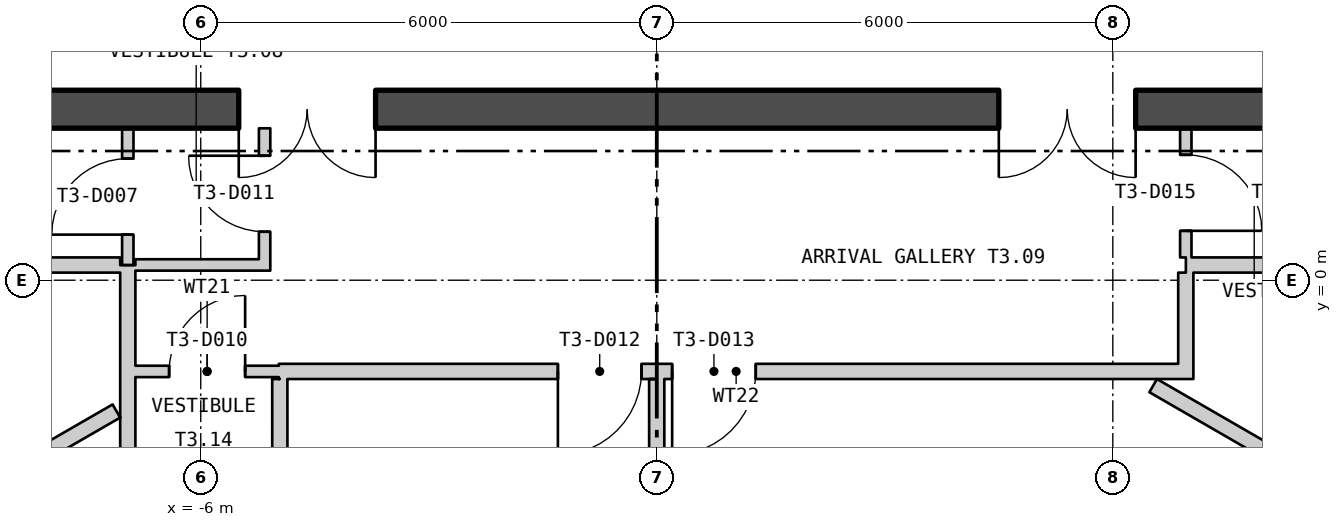
"""IFC4 building model, lengths in metres.
Left out: names, types, materials, properties, quantities, classifications, styles, units other than length and angle.
Written with IfcOpenShell. Run it as: python <this file> out.ifc"""

import sys

from ifc_helpers import new_model, si_unit, direction, frame, frame_2d, origin, place, context, subcontext, project, spatial, polyline, rectangle, outline, extrude, element, fill, save


model = new_model("IFC4")
c1 = context("Model", 3, precision=1e-05, world=origin(), true_north=direction((0.0, 1.0)))
c2 = subcontext(c1, "Body", "Model", "MODEL_VIEW")
j1 = project(units=[si_unit("LENGTHUNIT", "METRE"), si_unit("PLANEANGLEUNIT", "RADIAN")], contexts=[c1])
p1 = place(None, origin())
s1 = spatial("IfcSite", under=j1, at=p1, CompositionType="ELEMENT")
p2 = place(p1, origin())
s2 = spatial("IfcBuilding", under=s1, at=p2, CompositionType="ELEMENT")
p3 = place(p2, frame((0.0, 0.0, 186.6)))
s3 = spatial("IfcBuildingStorey", under=s2, at=p3, CompositionType="ELEMENT", Elevation=186.6)
p4 = place(p3, frame((-26.67, 13.393, -0.18), z_axis=(0.0, 0.0, 1.0), x_axis=(0.500000711659, -0.866024992908, 0.0)))
e1 = element("IfcWall", 1, at=p4, inside=s3, PredefinedType="SOLIDWALL", context=c2, shape_type="SweptSolid", body=[
    extrude(outline(polyline([(-0.13, -0.225), (45.87, -0.225), (45.61, 0.225), (0.13, 0.225), (-0.13, -0.225)])), origin(), (0.0, 0.0, 1.0), 6.0),
])
p5 = place(p4, frame((1.424, 0.0, 1.38)))
e2 = element("IfcOpeningElement", 2, at=p5, cuts=e1, PredefinedType="OPENING", context=c2, shape_type="SweptSolid", body=[
    extrude(rectangle(XDim=2.4, YDim=3.6, at=frame_2d((1.2, 1.8))), frame((0.0, 0.235, 0.0), z_axis=(0.0, -1.0, 0.0), x_axis=(1.0, 0.0, 0.0)), (0.0, 0.0, 1.0), 0.47),
])
p6 = place(p4, frame((5.893, 0.0, 1.38)))
e3 = element("IfcOpeningElement", 3, at=p6, cuts=e1, PredefinedType="OPENING", context=c2, shape_type="SweptSolid", body=[
    extrude(rectangle(XDim=2.4, YDim=3.6, at=frame_2d((1.2, 1.8))), frame((0.0, 0.235, 0.0), z_axis=(0.0, -1.0, 0.0), x_axis=(1.0, 0.0, 0.0)), (0.0, 0.0, 1.0), 0.47),
])
p7 = place(p4, frame((10.401, 0.0, 1.38)))
e4 = element("IfcOpeningElement", 4, at=p7, cuts=e1, PredefinedType="OPENING", context=c2, shape_type="SweptSolid", body=[
    extrude(rectangle(XDim=2.4, YDim=3.6, at=frame_2d((1.2, 1.8))), frame((0.0, 0.235, 0.0), z_axis=(0.0, -1.0, 0.0), x_axis=(1.0, 0.0, 0.0)), (0.0, 0.0, 1.0), 0.47),
])
p8 = place(p4, frame((14.909, 0.0, 1.38)))
e5 = element("IfcOpeningElement", 5, at=p8, cuts=e1, PredefinedType="OPENING", context=c2, shape_type="SweptSolid", body=[
    extrude(rectangle(XDim=2.4, YDim=3.6, at=frame_2d((1.2, 1.8))), frame((0.0, 0.235, 0.0), z_axis=(0.0, -1.0, 0.0), x_axis=(1.0, 0.0, 0.0)), (0.0, 0.0, 1.0), 0.47),
])
p9 = place(p4, frame((19.416, 0.0, 1.38)))
e6 = element("IfcOpeningElement", 6, at=p9, cuts=e1, PredefinedType="OPENING", context=c2, shape_type="SweptSolid", body=[
    extrude(rectangle(XDim=2.4, YDim=3.6, at=frame_2d((1.2, 1.8))), frame((0.0, 0.235, 0.0), z_axis=(0.0, -1.0, 0.0), x_axis=(1.0, 0.0, 0.0)), (0.0, 0.0, 1.0), 0.47),
])
p10 = place(p4, frame((23.924, 0.0, 1.38)))
e7 = element("IfcOpeningElement", 7, at=p10, cuts=e1, PredefinedType="OPENING", context=c2, shape_type="SweptSolid", body=[
    extrude(rectangle(XDim=2.4, YDim=3.6, at=frame_2d((1.2, 1.8))), frame((0.0, 0.235, 0.0), z_axis=(0.0, -1.0, 0.0), x_axis=(1.0, 0.0, 0.0)), (0.0, 0.0, 1.0), 0.47),
])
p11 = place(p4, frame((28.431, 0.0, 1.38)))
e8 = element("IfcOpeningElement", 8, at=p11, cuts=e1, PredefinedType="OPENING", context=c2, shape_type="SweptSolid", body=[
    extrude(rectangle(XDim=2.4, YDim=3.6, at=frame_2d((1.2, 1.8))), frame((0.0, 0.235, 0.0), z_axis=(0.0, -1.0, 0.0), x_axis=(1.0, 0.0, 0.0)), (0.0, 0.0, 1.0), 0.47),
])
p12 = place(p4, frame((32.939, 0.0, 1.38)))
e9 = element("IfcOpeningElement", 9, at=p12, cuts=e1, PredefinedType="OPENING", context=c2, shape_type="SweptSolid", body=[
    extrude(rectangle(XDim=2.4, YDim=3.6, at=frame_2d((1.2, 1.8))), frame((0.0, 0.235, 0.0), z_axis=(0.0, -1.0, 0.0), x_axis=(1.0, 0.0, 0.0)), (0.0, 0.0, 1.0), 0.47),
])
p13 = place(p4, frame((37.447, 0.0, 1.38)))
e10 = element("IfcOpeningElement", 10, at=p13, cuts=e1, PredefinedType="OPENING", context=c2, shape_type="SweptSolid", body=[
    extrude(rectangle(XDim=2.4, YDim=3.6, at=frame_2d((1.2, 1.8))), frame((0.0, 0.235, 0.0), z_axis=(0.0, -1.0, 0.0), x_axis=(1.0, 0.0, 0.0)), (0.0, 0.0, 1.0), 0.47),
])
p14 = place(p4, frame((41.916, 0.0, 1.38)))
e11 = element("IfcOpeningElement", 11, at=p14, cuts=e1, PredefinedType="OPENING", context=c2, shape_type="SweptSolid", body=[
    extrude(rectangle(XDim=2.4, YDim=3.6, at=frame_2d((1.2, 1.8))), frame((0.0, 0.235, 0.0), z_axis=(0.0, -1.0, 0.0), x_axis=(1.0, 0.0, 0.0)), (0.0, 0.0, 1.0), 0.47),
])
p15 = place(p3, frame((3.8, -26.219, -0.18), z_axis=(0.0, 0.0, 1.0), x_axis=(0.500000711659, 0.866024992908, 0.0)))
e12 = element("IfcWall", 12, at=p15, inside=s3, PredefinedType="SOLIDWALL", context=c2, shape_type="SweptSolid", body=[
    extrude(outline(polyline([(-0.13, -0.225), (45.87, -0.225), (45.61, 0.225), (0.13, 0.225), (-0.13, -0.225)])), origin(), (0.0, 0.0, 1.0), 6.0),
])
p16 = place(p15, frame((1.424, 0.0, 1.38)))
e13 = element("IfcOpeningElement", 13, at=p16, cuts=e12, PredefinedType="OPENING", context=c2, shape_type="SweptSolid", body=[
    extrude(rectangle(XDim=2.4, YDim=3.6, at=frame_2d((1.2, 1.8))), frame((0.0, 0.235, 0.0), z_axis=(0.0, -1.0, 0.0), x_axis=(1.0, 0.0, 0.0)), (0.0, 0.0, 1.0), 0.47),
])
p17 = place(p15, frame((5.893, 0.0, 1.38)))
e14 = element("IfcOpeningElement", 14, at=p17, cuts=e12, PredefinedType="OPENING", context=c2, shape_type="SweptSolid", body=[
    extrude(rectangle(XDim=2.4, YDim=3.6, at=frame_2d((1.2, 1.8))), frame((0.0, 0.235, 0.0), z_axis=(0.0, -1.0, 0.0), x_axis=(1.0, 0.0, 0.0)), (0.0, 0.0, 1.0), 0.47),
])
p18 = place(p15, frame((10.401, 0.0, 1.38)))
e15 = element("IfcOpeningElement", 15, at=p18, cuts=e12, PredefinedType="OPENING", context=c2, shape_type="SweptSolid", body=[
    extrude(rectangle(XDim=2.4, YDim=3.6, at=frame_2d((1.2, 1.8))), frame((0.0, 0.235, 0.0), z_axis=(0.0, -1.0, 0.0), x_axis=(1.0, 0.0, 0.0)), (0.0, 0.0, 1.0), 0.47),
])
p19 = place(p15, frame((14.909, 0.0, 1.38)))
e16 = element("IfcOpeningElement", 16, at=p19, cuts=e12, PredefinedType="OPENING", context=c2, shape_type="SweptSolid", body=[
    extrude(rectangle(XDim=2.4, YDim=3.6, at=frame_2d((1.2, 1.8))), frame((0.0, 0.235, 0.0), z_axis=(0.0, -1.0, 0.0), x_axis=(1.0, 0.0, 0.0)), (0.0, 0.0, 1.0), 0.47),
])
p20 = place(p15, frame((19.416, 0.0, 1.38)))
e17 = element("IfcOpeningElement", 17, at=p20, cuts=e12, PredefinedType="OPENING", context=c2, shape_type="SweptSolid", body=[
    extrude(rectangle(XDim=2.4, YDim=3.6, at=frame_2d((1.2, 1.8))), frame((0.0, 0.235, 0.0), z_axis=(0.0, -1.0, 0.0), x_axis=(1.0, 0.0, 0.0)), (0.0, 0.0, 1.0), 0.47),
])
p21 = place(p15, frame((23.924, 0.0, 1.38)))
e18 = element("IfcOpeningElement", 18, at=p21, cuts=e12, PredefinedType="OPENING", context=c2, shape_type="SweptSolid", body=[
    extrude(rectangle(XDim=2.4, YDim=3.6, at=frame_2d((1.2, 1.8))), frame((0.0, 0.235, 0.0), z_axis=(0.0, -1.0, 0.0), x_axis=(1.0, 0.0, 0.0)), (0.0, 0.0, 1.0), 0.47),
])
p22 = place(p15, frame((28.431, 0.0, 1.38)))
e19 = element("IfcOpeningElement", 19, at=p22, cuts=e12, PredefinedType="OPENING", context=c2, shape_type="SweptSolid", body=[
    extrude(rectangle(XDim=2.4, YDim=3.6, at=frame_2d((1.2, 1.8))), frame((0.0, 0.235, 0.0), z_axis=(0.0, -1.0, 0.0), x_axis=(1.0, 0.0, 0.0)), (0.0, 0.0, 1.0), 0.47),
])
p23 = place(p15, frame((32.939, 0.0, 1.38)))
e20 = element("IfcOpeningElement", 20, at=p23, cuts=e12, PredefinedType="OPENING", context=c2, shape_type="SweptSolid", body=[
    extrude(rectangle(XDim=2.4, YDim=3.6, at=frame_2d((1.2, 1.8))), frame((0.0, 0.235, 0.0), z_axis=(0.0, -1.0, 0.0), x_axis=(1.0, 0.0, 0.0)), (0.0, 0.0, 1.0), 0.47),
])
p24 = place(p15, frame((37.447, 0.0, 1.38)))
e21 = element("IfcOpeningElement", 21, at=p24, cuts=e12, PredefinedType="OPENING", context=c2, shape_type="SweptSolid", body=[
    extrude(rectangle(XDim=2.4, YDim=3.6, at=frame_2d((1.2, 1.8))), frame((0.0, 0.235, 0.0), z_axis=(0.0, -1.0, 0.0), x_axis=(1.0, 0.0, 0.0)), (0.0, 0.0, 1.0), 0.47),
])
p25 = place(p15, frame((41.916, 0.0, 1.38)))
e22 = element("IfcOpeningElement", 22, at=p25, cuts=e12, PredefinedType="OPENING", context=c2, shape_type="SweptSolid", body=[
    extrude(rectangle(XDim=2.4, YDim=3.6, at=frame_2d((1.2, 1.8))), frame((0.0, 0.235, 0.0), z_axis=(0.0, -1.0, 0.0), x_axis=(1.0, 0.0, 0.0)), (0.0, 0.0, 1.0), 0.47),
])
p26 = place(p3, frame((-16.2, 2.25, 0.0), z_axis=(0.0, 0.0, 1.0), x_axis=(1.0, 0.0, 0.0)))
e23 = element("IfcWall", 23, at=p26, inside=s3, PredefinedType="SHEAR", context=c2, shape_type="SweptSolid", body=[
    extrude(rectangle(XDim=32.4, YDim=0.5, at=frame_2d((16.2, 0.0))), origin(), (0.0, 0.0, 1.0), 5.8),
])
p27 = place(p26, frame((10.7, 0.0, 0.0)))
e24 = element("IfcOpeningElement", 24, at=p27, cuts=e23, PredefinedType="OPENING", context=c2, shape_type="SweptSolid", body=[
    extrude(rectangle(XDim=1.8, YDim=2.4, at=frame_2d((0.9, 1.2))), frame((0.0, 0.26, 0.0), z_axis=(0.0, -1.0, 0.0), x_axis=(1.0, 0.0, 0.0)), (0.0, 0.0, 1.0), 0.52),
])
p28 = place(p26, frame((20.7, 0.0, 0.0)))
e25 = element("IfcOpeningElement", 25, at=p28, cuts=e23, PredefinedType="OPENING", context=c2, shape_type="SweptSolid", body=[
    extrude(rectangle(XDim=1.8, YDim=2.4, at=frame_2d((0.9, 1.2))), frame((0.0, 0.26, 0.0), z_axis=(0.0, -1.0, 0.0), x_axis=(1.0, 0.0, 0.0)), (0.0, 0.0, 1.0), 0.52),
])
p29 = place(p3, frame((-17.9, 0.2, 0.0), z_axis=(0.0, 0.0, 1.0), x_axis=(1.0, 0.0, 0.0)))
e26 = element("IfcWall", 26, at=p29, inside=s3, PredefinedType="PARTITIONING", context=c2, shape_type="SweptSolid", body=[
    extrude(rectangle(XDim=10.84, YDim=0.2, at=frame_2d((5.42, 0.0))), origin(), (0.0, 0.0, 1.0), 5.8),
])
p30 = place(p29, frame((6.489, 0.0, 0.0)))
e27 = element("IfcOpeningElement", 27, at=p30, cuts=e26, PredefinedType="OPENING", context=c2, shape_type="SweptSolid", body=[
    extrude(rectangle(XDim=1.1, YDim=2.1, at=frame_2d((0.55, 1.05))), frame((0.0, 0.11, 0.0), z_axis=(0.0, -1.0, 0.0), x_axis=(1.0, 0.0, 0.0)), (0.0, 0.0, 1.0), 0.22),
])
p31 = place(p3, frame((-14.651, -6.075, 0.0), z_axis=(0.0, 0.0, 1.0), x_axis=(0.866015377534, 0.500017365573, 0.0)))
e28 = element("IfcWall", 28, at=p31, inside=s3, PredefinedType="PARTITIONING", context=c2, shape_type="SweptSolid", body=[
    extrude(rectangle(XDim=8.708, YDim=0.2, at=frame_2d((4.354, 0.0))), origin(), (0.0, 0.0, 1.0), 5.8),
])
p32 = place(p3, frame((-6.96, -3.2, 0.0), z_axis=(0.0, 0.0, 1.0), x_axis=(0.0, 1.0, 0.0)))
e29 = element("IfcWall", 29, at=p32, inside=s3, PredefinedType="PARTITIONING", context=c2, shape_type="SweptSolid", body=[
    extrude(rectangle(XDim=3.398, YDim=0.2, at=frame_2d((1.699, 0.0))), origin(), (0.0, 0.0, 1.0), 5.8),
])
p33 = place(p3, frame((-6.96, 0.201, 0.0), z_axis=(0.0, 0.0, 1.0), x_axis=(0.0, 1.0, 0.0)))
e30 = element("IfcWall", 30, at=p33, inside=s3, PredefinedType="PARTITIONING", context=c2, shape_type="SweptSolid", body=[
    extrude(rectangle(XDim=1.798, YDim=0.15, at=frame_2d((0.899, 0.0))), origin(), (0.0, 0.0, 1.0), 5.8),
])
p34 = place(p33, frame((0.399, 0.0, 0.0)))
e31 = element("IfcOpeningElement", 31, at=p34, cuts=e30, PredefinedType="OPENING", context=c2, shape_type="SweptSolid", body=[
    extrude(rectangle(XDim=1.0, YDim=2.1, at=frame_2d((0.5, 1.05))), frame((0.0, 0.085, 0.0), z_axis=(0.0, -1.0, 0.0), x_axis=(1.0, 0.0, 0.0)), (0.0, 0.0, 1.0), 0.17),
])
p35 = place(p3, frame((-6.86, -1.2, 0.0), z_axis=(0.0, 0.0, 1.0), x_axis=(1.0, 0.0, 0.0)))
e32 = element("IfcWall", 32, at=p35, inside=s3, PredefinedType="PARTITIONING", context=c2, shape_type="SweptSolid", body=[
    extrude(rectangle(XDim=1.888, YDim=0.15, at=frame_2d((0.944, 0.0))), origin(), (0.0, 0.0, 1.0), 5.8),
])
p36 = place(p35, frame((0.444, 0.0, 0.0)))
e33 = element("IfcOpeningElement", 33, at=p36, cuts=e32, PredefinedType="OPENING", context=c2, shape_type="SweptSolid", body=[
    extrude(rectangle(XDim=1.0, YDim=2.1, at=frame_2d((0.5, 1.05))), frame((0.0, 0.085, 0.0), z_axis=(0.0, -1.0, 0.0), x_axis=(1.0, 0.0, 0.0)), (0.0, 0.0, 1.0), 0.17),
])
p37 = place(p3, frame((-6.86, 0.201, 0.0), z_axis=(0.0, 0.0, 1.0), x_axis=(1.0, 0.0, 0.0)))
e34 = element("IfcWall", 34, at=p37, inside=s3, PredefinedType="PARTITIONING", context=c2, shape_type="SweptSolid", body=[
    extrude(rectangle(XDim=1.775, YDim=0.15, at=frame_2d((0.887, 0.0))), origin(), (0.0, 0.0, 1.0), 5.8),
])
p38 = place(p3, frame((-5.16, 0.276, 0.0), z_axis=(0.0, 0.0, 1.0), x_axis=(0.0, 1.0, 0.0)))
e35 = element("IfcWall", 35, at=p38, inside=s3, PredefinedType="PARTITIONING", context=c2, shape_type="SweptSolid", body=[
    extrude(rectangle(XDim=1.723, YDim=0.15, at=frame_2d((0.862, 0.0))), origin(), (0.0, 0.0, 1.0), 5.8),
])
p39 = place(p38, frame((0.362, 0.0, 0.0)))
e36 = element("IfcOpeningElement", 36, at=p39, cuts=e35, PredefinedType="OPENING", context=c2, shape_type="SweptSolid", body=[
    extrude(rectangle(XDim=1.0, YDim=2.1, at=frame_2d((0.5, 1.05))), frame((0.0, 0.085, 0.0), z_axis=(0.0, -1.0, 0.0), x_axis=(1.0, 0.0, 0.0)), (0.0, 0.0, 1.0), 0.17),
])
p40 = place(p3, frame((-4.972, -1.2, 0.0), z_axis=(0.0, 0.0, 1.0), x_axis=(1.0, 0.0, 0.0)))
e37 = element("IfcWall", 37, at=p40, inside=s3, PredefinedType="PARTITIONING", context=c2, shape_type="SweptSolid", body=[
    extrude(rectangle(XDim=12.032, YDim=0.2, at=frame_2d((6.016, 0.0))), origin(), (0.0, 0.0, 1.0), 5.8),
])
p41 = place(p40, frame((3.671, 0.0, 0.0)))
e38 = element("IfcOpeningElement", 38, at=p41, cuts=e37, PredefinedType="OPENING", context=c2, shape_type="SweptSolid", body=[
    extrude(rectangle(XDim=1.1, YDim=2.1, at=frame_2d((0.55, 1.05))), frame((0.0, 0.11, 0.0), z_axis=(0.0, -1.0, 0.0), x_axis=(1.0, 0.0, 0.0)), (0.0, 0.0, 1.0), 0.22),
])
p42 = place(p40, frame((5.174, 0.0, 0.0)))
e39 = element("IfcOpeningElement", 39, at=p42, cuts=e37, PredefinedType="OPENING", context=c2, shape_type="SweptSolid", body=[
    extrude(rectangle(XDim=1.1, YDim=2.1, at=frame_2d((0.55, 1.05))), frame((0.0, 0.11, 0.0), z_axis=(0.0, -1.0, 0.0), x_axis=(1.0, 0.0, 0.0)), (0.0, 0.0, 1.0), 0.22),
])
p43 = place(p3, frame((-4.959, -3.48, 0.0), z_axis=(0.0, 0.0, 1.0), x_axis=(-0.000458715548, 0.99999989479, 0.0)))
e40 = element("IfcWall", 40, at=p43, inside=s3, PredefinedType="PARTITIONING", context=c2, shape_type="SweptSolid", body=[
    extrude(rectangle(XDim=2.18, YDim=0.2, at=frame_2d((1.09, 0.0))), origin(), (0.0, 0.0, 1.0), 5.8),
])
p44 = place(p3, frame((-0.001, -1.3, 0.0), z_axis=(0.0, 0.0, 1.0), x_axis=(0.000444444401, -0.999999901235, 0.0)))
e41 = element("IfcWall", 41, at=p44, inside=s3, PredefinedType="PARTITIONING", context=c2, shape_type="SweptSolid", body=[
    extrude(rectangle(XDim=1.8, YDim=0.2, at=frame_2d((0.9, 0.0))), origin(), (0.0, 0.0, 1.0), 5.25),
])
p45 = place(p3, frame((6.531, -1.387, 0.0), z_axis=(0.0, 0.0, 1.0), x_axis=(0.866029291668, -0.499993265928, 0.0)))
e42 = element("IfcWall", 42, at=p45, inside=s3, PredefinedType="PARTITIONING", context=c2, shape_type="SweptSolid", body=[
    extrude(rectangle(XDim=9.376, YDim=0.2, at=frame_2d((4.688, 0.0))), origin(), (0.0, 0.0, 1.0), 5.8),
])
p46 = place(p3, frame((6.96, -1.1, 0.0), z_axis=(0.0, 0.0, 1.0), x_axis=(0.0, 1.0, 0.0)))
e43 = element("IfcWall", 43, at=p46, inside=s3, PredefinedType="PARTITIONING", context=c2, shape_type="SweptSolid", body=[
    extrude(rectangle(XDim=1.2, YDim=0.2, at=frame_2d((0.6, 0.0))), origin(), (0.0, 0.0, 1.0), 5.8),
])
p47 = place(p3, frame((6.96, 0.3, 0.0), z_axis=(0.0, 0.0, 1.0), x_axis=(0.0, 1.0, 0.0)))
e44 = element("IfcWall", 44, at=p47, inside=s3, PredefinedType="PARTITIONING", context=c2, shape_type="SweptSolid", body=[
    extrude(rectangle(XDim=1.7, YDim=0.15, at=frame_2d((0.85, 0.0))), origin(), (0.0, 0.0, 1.0), 5.8),
])
p48 = place(p47, frame((0.35, 0.0, 0.0)))
e45 = element("IfcOpeningElement", 45, at=p48, cuts=e44, PredefinedType="OPENING", context=c2, shape_type="SweptSolid", body=[
    extrude(rectangle(XDim=1.0, YDim=2.1, at=frame_2d((0.5, 1.05))), frame((0.0, 0.085, 0.0), z_axis=(0.0, -1.0, 0.0), x_axis=(1.0, 0.0, 0.0)), (0.0, 0.0, 1.0), 0.17),
])
p49 = place(p3, frame((6.961, 0.2, 0.0), z_axis=(0.0, 0.0, 1.0), x_axis=(1.0, 0.0, 0.0)))
e46 = element("IfcWall", 46, at=p49, inside=s3, PredefinedType="PARTITIONING", context=c2, shape_type="SweptSolid", body=[
    extrude(rectangle(XDim=11.024, YDim=0.2, at=frame_2d((5.512, 0.0))), origin(), (0.0, 0.0, 1.0), 5.8),
])
p50 = place(p49, frame((4.844, 0.0, 0.0)))
e47 = element("IfcOpeningElement", 47, at=p50, cuts=e46, PredefinedType="OPENING", context=c2, shape_type="SweptSolid", body=[
    extrude(rectangle(XDim=1.1, YDim=2.1, at=frame_2d((0.55, 1.05))), frame((0.0, 0.11, 0.0), z_axis=(0.0, -1.0, 0.0), x_axis=(1.0, 0.0, 0.0)), (0.0, 0.0, 1.0), 0.22),
])
p51 = place(p27, origin())
e48 = element("IfcDoor", 48, at=p51, inside=s3, OperationType="DOUBLE_DOOR_SINGLE_SWING", PredefinedType="DOOR", context=c2, shape_type="SweptSolid", body=[
    extrude(rectangle(XDim=1.8, YDim=2.4, at=frame_2d((0.9, 1.2))), frame((0.0, 0.025, 0.0), z_axis=(0.0, -1.0, 0.0), x_axis=(1.0, 0.0, 0.0)), (0.0, 0.0, 1.0), 0.05),
])
fill(e24, e48)
p52 = place(p28, origin())
e49 = element("IfcDoor", 49, at=p52, inside=s3, OperationType="DOUBLE_DOOR_SINGLE_SWING", PredefinedType="DOOR", context=c2, shape_type="SweptSolid", body=[
    extrude(rectangle(XDim=1.8, YDim=2.4, at=frame_2d((0.9, 1.2))), frame((0.0, 0.025, 0.0), z_axis=(0.0, -1.0, 0.0), x_axis=(1.0, 0.0, 0.0)), (0.0, 0.0, 1.0), 0.05),
])
fill(e25, e49)
p53 = place(p34, origin())
e50 = element("IfcDoor", 50, at=p53, inside=s3, OperationType="SINGLE_SWING_RIGHT", PredefinedType="DOOR", context=c2, shape_type="SweptSolid", body=[
    extrude(rectangle(XDim=1.0, YDim=2.1, at=frame_2d((0.5, 1.05))), frame((0.0, 0.025, 0.0), z_axis=(0.0, -1.0, 0.0), x_axis=(1.0, 0.0, 0.0)), (0.0, 0.0, 1.0), 0.05),
])
fill(e31, e50)
p54 = place(p36, origin())
e51 = element("IfcDoor", 51, at=p54, inside=s3, OperationType="SINGLE_SWING_LEFT", PredefinedType="DOOR", context=c2, shape_type="SweptSolid", body=[
    extrude(rectangle(XDim=1.0, YDim=2.1, at=frame_2d((0.5, 1.05))), frame((0.0, 0.025, 0.0), z_axis=(0.0, -1.0, 0.0), x_axis=(1.0, 0.0, 0.0)), (0.0, 0.0, 1.0), 0.05),
])
fill(e33, e51)
p55 = place(p39, origin())
e52 = element("IfcDoor", 52, at=p55, inside=s3, OperationType="SINGLE_SWING_LEFT", PredefinedType="DOOR", context=c2, shape_type="SweptSolid", body=[
    extrude(rectangle(XDim=1.0, YDim=2.1, at=frame_2d((0.5, 1.05))), frame((0.0, 0.025, 0.0), z_axis=(0.0, -1.0, 0.0), x_axis=(1.0, 0.0, 0.0)), (0.0, 0.0, 1.0), 0.05),
])
fill(e36, e52)
p56 = place(p41, origin())
e53 = element("IfcDoor", 53, at=p56, inside=s3, OperationType="SINGLE_SWING_LEFT", PredefinedType="DOOR", context=c2, shape_type="SweptSolid", body=[
    extrude(rectangle(XDim=1.1, YDim=2.1, at=frame_2d((0.55, 1.05))), frame((0.0, 0.025, 0.0), z_axis=(0.0, -1.0, 0.0), x_axis=(1.0, 0.0, 0.0)), (0.0, 0.0, 1.0), 0.05),
])
fill(e38, e53)
p57 = place(p42, origin())
e54 = element("IfcDoor", 54, at=p57, inside=s3, OperationType="SINGLE_SWING_LEFT", PredefinedType="DOOR", context=c2, shape_type="SweptSolid", body=[
    extrude(rectangle(XDim=1.1, YDim=2.1, at=frame_2d((0.55, 1.05))), frame((0.0, 0.025, 0.0), z_axis=(0.0, -1.0, 0.0), x_axis=(1.0, 0.0, 0.0)), (0.0, 0.0, 1.0), 0.05),
])
fill(e39, e54)
p58 = place(p48, origin())
e55 = element("IfcDoor", 55, at=p58, inside=s3, OperationType="SINGLE_SWING_LEFT", PredefinedType="DOOR", context=c2, shape_type="SweptSolid", body=[
    extrude(rectangle(XDim=1.0, YDim=2.1, at=frame_2d((0.5, 1.05))), frame((0.0, 0.025, 0.0), z_axis=(0.0, -1.0, 0.0), x_axis=(1.0, 0.0, 0.0)), (0.0, 0.0, 1.0), 0.05),
])
fill(e45, e55)
save(model, sys.argv[1])
